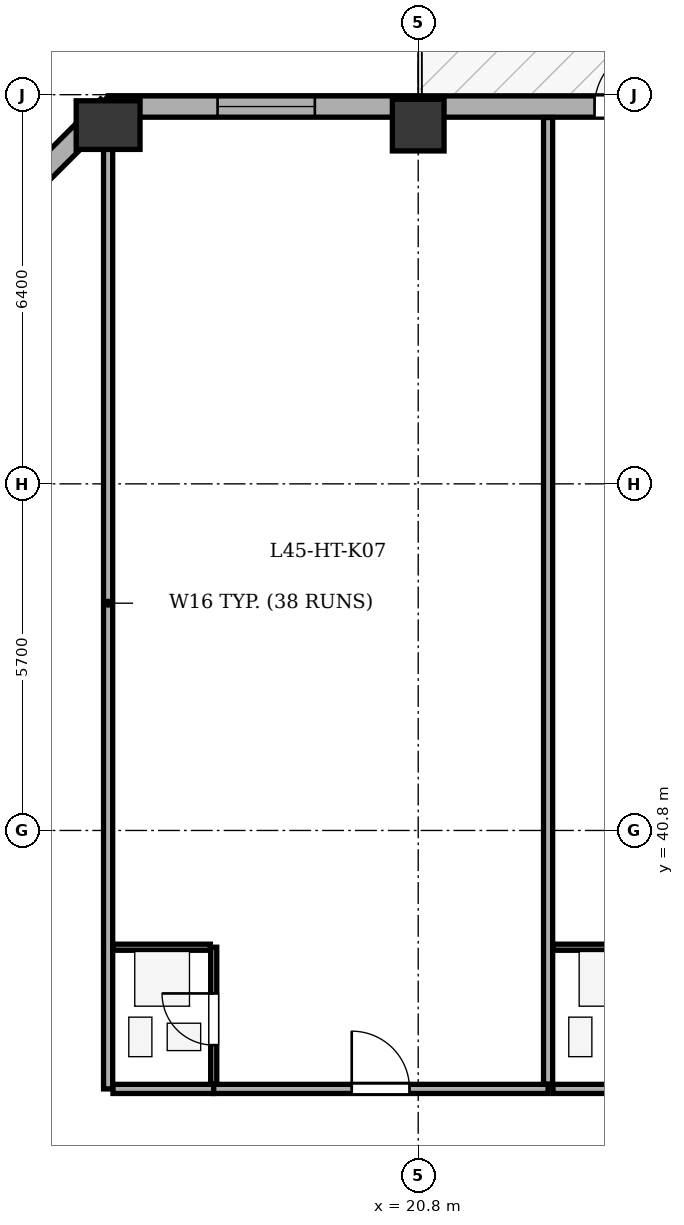
"""IFC4 building model, lengths in metres.
Left out: names, types, materials, properties, quantities, classifications, styles, units other than length and angle.
Written with IfcOpenShell. Run it as: python <this file> out.ifc"""

import sys

from ifc_helpers import new_model, si_unit, direction, frame, frame_2d, origin, origin_2d, place, context, subcontext, project, spatial, rectangle, extrude, element, fill, save


model = new_model("IFC4")
c1 = context("Model", 3, precision=1e-05, world=origin(), true_north=direction((0.0, 1.0)))
c2 = subcontext(c1, "Body", "Model", "MODEL_VIEW")
j1 = project(units=[si_unit("LENGTHUNIT", "METRE"), si_unit("PLANEANGLEUNIT", "RADIAN")], contexts=[c1])
p1 = place(None, origin())
s1 = spatial("IfcSite", under=j1, at=p1, CompositionType="ELEMENT")
p2 = place(p1, origin())
s2 = spatial("IfcBuilding", under=s1, at=p2, CompositionType="ELEMENT")
p3 = place(p2, frame((0.0, 0.0, 176.3)))
s3 = spatial("IfcBuildingStorey", under=s2, at=p3, CompositionType="ELEMENT", Elevation=176.3)
p4 = place(p3, frame((15.7, 52.4, 0.0), z_axis=(0.0, 0.0, 1.0), x_axis=(1.0, 0.0, 0.0)))
e1 = element("IfcColumn", 1, at=p4, inside=s3, PredefinedType="COLUMN", context=c2, shape_type="SweptSolid", body=[
    extrude(rectangle(XDim=0.8, YDim=1.05, at=origin_2d()), origin(), (0.0, 0.0, 1.0), 3.5),
])
p5 = place(p3, frame((20.8, 52.4, 0.0), z_axis=(0.0, 0.0, 1.0), x_axis=(1.0, 0.0, 0.0)))
e2 = element("IfcColumn", 2, at=p5, inside=s3, PredefinedType="COLUMN", context=c2, shape_type="SweptSolid", body=[
    extrude(rectangle(XDim=0.85, YDim=0.85, at=origin_2d()), origin(), (0.0, 0.0, 1.0), 3.5),
])
p6 = place(p3, frame((10.895, 47.9, 0.0), z_axis=(0.0, 0.0, 1.0), x_axis=(0.707088817216, 0.7071247447, 0.0)))
e3 = element("IfcWall", 3, at=p6, inside=s3, PredefinedType="STANDARD", context=c2, shape_type="SweptSolid", body=[
    extrude(rectangle(XDim=6.795, YDim=0.35, at=frame_2d((3.398, 0.0))), origin(), (0.0, 0.0, 1.0), 2.785),
])
p7 = place(p6, frame((2.698, 0.0, 0.75)))
e4 = element("IfcOpeningElement", 4, at=p7, cuts=e3, PredefinedType="OPENING", context=c2, shape_type="SweptSolid", body=[
    extrude(rectangle(XDim=1.4, YDim=1.65, at=frame_2d((0.7, 0.825))), frame((0.0, 0.185, 0.0), z_axis=(0.0, -1.0, 0.0), x_axis=(1.0, 0.0, 0.0)), (0.0, 0.0, 1.0), 0.37),
])
p8 = place(p3, frame((15.7, 52.705, 0.0), z_axis=(0.0, 0.0, 1.0), x_axis=(1.0, 0.0, 0.0)))
e5 = element("IfcWall", 5, at=p8, inside=s3, PredefinedType="STANDARD", context=c2, shape_type="SweptSolid", body=[
    extrude(rectangle(XDim=35.0, YDim=0.35, at=frame_2d((17.5, 0.0))), origin(), (0.0, 0.0, 1.0), 2.785),
])
p9 = place(p8, frame((8.0, 0.0, 0.0)))
e6 = element("IfcOpeningElement", 6, at=p9, cuts=e5, PredefinedType="OPENING", context=c2, shape_type="SweptSolid", body=[
    extrude(rectangle(XDim=1.0, YDim=2.02, at=frame_2d((0.5, 1.01))), frame((0.0, 0.185, 0.0), z_axis=(0.0, -1.0, 0.0), x_axis=(1.0, 0.0, 0.0)), (0.0, 0.0, 1.0), 0.37),
])
p10 = place(p8, frame((1.8, 0.0, 0.75)))
e7 = element("IfcOpeningElement", 7, at=p10, cuts=e5, PredefinedType="OPENING", context=c2, shape_type="SweptSolid", body=[
    extrude(rectangle(XDim=1.6, YDim=1.75, at=frame_2d((0.8, 0.875))), frame((0.0, 0.185, 0.0), z_axis=(0.0, -1.0, 0.0), x_axis=(1.0, 0.0, 0.0)), (0.0, 0.0, 1.0), 0.37),
])
p11 = place(p8, frame((16.4, 0.0, 0.75)))
e8 = element("IfcOpeningElement", 8, at=p11, cuts=e5, PredefinedType="OPENING", context=c2, shape_type="SweptSolid", body=[
    extrude(rectangle(XDim=1.6, YDim=1.75, at=frame_2d((0.8, 0.875))), frame((0.0, 0.185, 0.0), z_axis=(0.0, -1.0, 0.0), x_axis=(1.0, 0.0, 0.0)), (0.0, 0.0, 1.0), 0.37),
])
p12 = place(p8, frame((20.619, 0.0, 0.75)))
e9 = element("IfcOpeningElement", 9, at=p12, cuts=e5, PredefinedType="OPENING", context=c2, shape_type="SweptSolid", body=[
    extrude(rectangle(XDim=1.35, YDim=1.75, at=frame_2d((0.675, 0.875))), frame((0.0, 0.185, 0.0), z_axis=(0.0, -1.0, 0.0), x_axis=(1.0, 0.0, 0.0)), (0.0, 0.0, 1.0), 0.37),
])
p13 = place(p8, frame((24.235, 0.0, 0.75)))
e10 = element("IfcOpeningElement", 10, at=p13, cuts=e5, PredefinedType="OPENING", context=c2, shape_type="SweptSolid", body=[
    extrude(rectangle(XDim=1.6, YDim=1.75, at=frame_2d((0.8, 0.875))), frame((0.0, 0.185, 0.0), z_axis=(0.0, -1.0, 0.0), x_axis=(1.0, 0.0, 0.0)), (0.0, 0.0, 1.0), 0.37),
])
p14 = place(p8, frame((27.229, 0.0, 0.75)))
e11 = element("IfcOpeningElement", 11, at=p14, cuts=e5, PredefinedType="OPENING", context=c2, shape_type="SweptSolid", body=[
    extrude(rectangle(XDim=1.6, YDim=1.75, at=frame_2d((0.8, 0.875))), frame((0.0, 0.185, 0.0), z_axis=(0.0, -1.0, 0.0), x_axis=(1.0, 0.0, 0.0)), (0.0, 0.0, 1.0), 0.37),
])
p15 = place(p8, frame((31.637, 0.0, 0.75)))
e12 = element("IfcOpeningElement", 12, at=p15, cuts=e5, PredefinedType="OPENING", context=c2, shape_type="SweptSolid", body=[
    extrude(rectangle(XDim=1.6, YDim=1.75, at=frame_2d((0.8, 0.875))), frame((0.0, 0.185, 0.0), z_axis=(0.0, -1.0, 0.0), x_axis=(1.0, 0.0, 0.0)), (0.0, 0.0, 1.0), 0.37),
])
p16 = place(p3, frame((15.7, 36.55, 0.0), z_axis=(0.0, 0.0, 1.0), x_axis=(0.0, 1.0, 0.0)))
e13 = element("IfcWall", 13, at=p16, inside=s3, PredefinedType="PARTITIONING", context=c2, shape_type="SweptSolid", body=[
    extrude(rectangle(XDim=15.975, YDim=0.15, at=frame_2d((7.987, 0.0))), origin(), (0.0, 0.0, 1.0), 3.2),
])
p17 = place(p3, frame((15.78, 36.55, 0.0), z_axis=(0.0, 0.0, 1.0), x_axis=(1.0, 0.0, 0.0)))
e14 = element("IfcWall", 14, at=p17, inside=s3, PredefinedType="PARTITIONING", context=c2, shape_type="SweptSolid", body=[
    extrude(rectangle(XDim=1.656, YDim=0.15, at=frame_2d((0.828, 0.0))), origin(), (0.0, 0.0, 1.0), 3.2),
])
p18 = place(p3, frame((17.437, 36.55, 0.0), z_axis=(0.0, 0.0, 1.0), x_axis=(1.0, 0.0, 0.0)))
e15 = element("IfcWall", 15, at=p18, inside=s3, PredefinedType="PARTITIONING", context=c2, shape_type="SweptSolid", body=[
    extrude(rectangle(XDim=5.5, YDim=0.15, at=frame_2d((2.75, 0.0))), origin(), (0.0, 0.0, 1.0), 3.2),
])
p19 = place(p18, frame((2.27, 0.0, 0.0)))
e16 = element("IfcOpeningElement", 16, at=p19, cuts=e15, PredefinedType="OPENING", context=c2, shape_type="SweptSolid", body=[
    extrude(rectangle(XDim=0.95, YDim=2.1, at=frame_2d((0.475, 1.05))), frame((0.0, 0.085, 0.0), z_axis=(0.0, -1.0, 0.0), x_axis=(1.0, 0.0, 0.0)), (0.0, 0.0, 1.0), 0.17),
])
p20 = place(p3, frame((17.437, 36.63, 0.0), z_axis=(0.0, 0.0, 1.0), x_axis=(0.0, 1.0, 0.0)))
e17 = element("IfcWall", 17, at=p20, inside=s3, PredefinedType="PARTITIONING", context=c2, shape_type="SweptSolid", body=[
    extrude(rectangle(XDim=2.25, YDim=0.1, at=frame_2d((1.125, 0.0))), origin(), (0.0, 0.0, 1.0), 3.2),
])
p21 = place(p20, frame((0.64, 0.0, 0.0)))
e18 = element("IfcOpeningElement", 18, at=p21, cuts=e17, PredefinedType="OPENING", context=c2, shape_type="SweptSolid", body=[
    extrude(rectangle(XDim=0.85, YDim=2.05, at=frame_2d((0.425, 1.025))), frame((0.0, 0.06, 0.0), z_axis=(0.0, -1.0, 0.0), x_axis=(1.0, 0.0, 0.0)), (0.0, 0.0, 1.0), 0.12),
])
p22 = place(p3, frame((15.78, 38.88, 0.0), z_axis=(0.0, 0.0, 1.0), x_axis=(1.0, 0.0, 0.0)))
e19 = element("IfcWall", 19, at=p22, inside=s3, PredefinedType="PARTITIONING", context=c2, shape_type="SweptSolid", body=[
    extrude(rectangle(XDim=1.602, YDim=0.1, at=frame_2d((0.801, 0.0))), origin(), (0.0, 0.0, 1.0), 3.2),
])
p23 = place(p3, frame((22.936, 36.63, 0.0), z_axis=(0.0, 0.0, 1.0), x_axis=(0.0, 1.0, 0.0)))
e20 = element("IfcWall", 20, at=p23, inside=s3, PredefinedType="PARTITIONING", context=c2, shape_type="SweptSolid", body=[
    extrude(rectangle(XDim=15.895, YDim=0.15, at=frame_2d((7.948, 0.0))), origin(), (0.0, 0.0, 1.0), 3.2),
])
p24 = place(p3, frame((23.016, 36.55, 0.0), z_axis=(0.0, 0.0, 1.0), x_axis=(1.0, 0.0, 0.0)))
e21 = element("IfcWall", 21, at=p24, inside=s3, PredefinedType="PARTITIONING", context=c2, shape_type="SweptSolid", body=[
    extrude(rectangle(XDim=1.801, YDim=0.15, at=frame_2d((0.901, 0.0))), origin(), (0.0, 0.0, 1.0), 3.2),
])
p25 = place(p3, frame((23.016, 38.88, 0.0), z_axis=(0.0, 0.0, 1.0), x_axis=(1.0, 0.0, 0.0)))
e22 = element("IfcWall", 22, at=p25, inside=s3, PredefinedType="PARTITIONING", context=c2, shape_type="SweptSolid", body=[
    extrude(rectangle(XDim=1.746, YDim=0.1, at=frame_2d((0.873, 0.0))), origin(), (0.0, 0.0, 1.0), 3.2),
])
p26 = place(p9, origin())
e23 = element("IfcDoor", 23, at=p26, inside=s3, OperationType="SINGLE_SWING_RIGHT", PredefinedType="DOOR", context=c2, shape_type="SweptSolid", body=[
    extrude(rectangle(XDim=1.0, YDim=2.02, at=frame_2d((0.5, 1.01))), frame((0.0, 0.025, 0.0), z_axis=(0.0, -1.0, 0.0), x_axis=(1.0, 0.0, 0.0)), (0.0, 0.0, 1.0), 0.05),
])
fill(e6, e23)
p27 = place(p10, origin())
e24 = element("IfcWindow", 24, at=p27, inside=s3, PartitioningType="SINGLE_PANEL", PredefinedType="WINDOW", context=c2, shape_type="SweptSolid", body=[
    extrude(rectangle(XDim=1.6, YDim=1.75, at=frame_2d((0.8, 0.875))), frame((0.0, -0.01, 0.0), z_axis=(0.0, -1.0, 0.0), x_axis=(1.0, 0.0, 0.0)), (0.0, 0.0, 1.0), 0.06),
])
fill(e7, e24)
p28 = place(p21, origin())
e25 = element("IfcDoor", 25, at=p28, inside=s3, OperationType="SINGLE_SWING_RIGHT", PredefinedType="DOOR", context=c2, shape_type="SweptSolid", body=[
    extrude(rectangle(XDim=0.85, YDim=2.05, at=frame_2d((0.425, 1.025))), frame((0.0, 0.025, 0.0), z_axis=(0.0, -1.0, 0.0), x_axis=(1.0, 0.0, 0.0)), (0.0, 0.0, 1.0), 0.05),
])
fill(e18, e25)
p29 = place(p19, origin())
e26 = element("IfcDoor", 26, at=p29, inside=s3, OperationType="SINGLE_SWING_LEFT", PredefinedType="DOOR", context=c2, shape_type="SweptSolid", body=[
    extrude(rectangle(XDim=0.95, YDim=2.1, at=frame_2d((0.475, 1.05))), frame((0.0, 0.025, 0.0), z_axis=(0.0, -1.0, 0.0), x_axis=(1.0, 0.0, 0.0)), (0.0, 0.0, 1.0), 0.05),
])
fill(e16, e26)
save(model, sys.argv[1])
